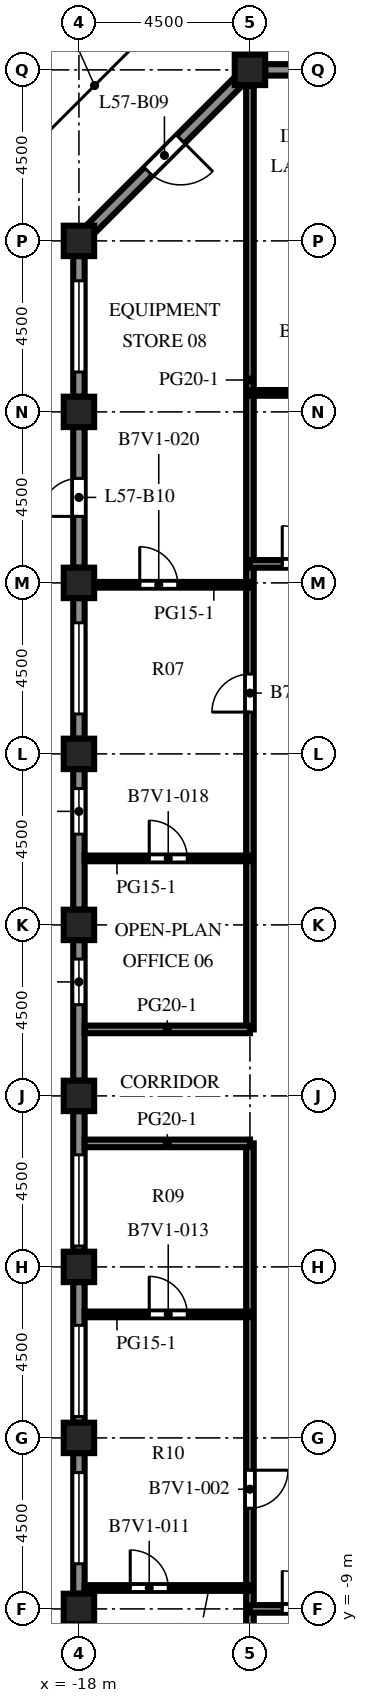
"""IFC4 building model, lengths in metres.
Left out: names, types, materials, properties, quantities, classifications, styles, units other than length and angle.
Written with IfcOpenShell. Run it as: python <this file> out.ifc"""

import sys

from ifc_helpers import new_model, si_unit, direction, frame, frame_2d, origin, origin_2d, place, context, subcontext, project, spatial, rectangle, extrude, element, fill, save


model = new_model("IFC4")
c1 = context("Model", 3, precision=1e-05, world=origin(), true_north=direction((0.0, 1.0)))
c2 = subcontext(c1, "Body", "Model", "MODEL_VIEW")
j1 = project(units=[si_unit("LENGTHUNIT", "METRE"), si_unit("PLANEANGLEUNIT", "RADIAN")], contexts=[c1])
p1 = place(None, origin())
s1 = spatial("IfcSite", under=j1, at=p1, CompositionType="ELEMENT")
p2 = place(p1, origin())
s2 = spatial("IfcBuilding", under=s1, at=p2, CompositionType="ELEMENT")
p3 = place(p2, frame((0.0, 0.0, 252.1)))
s3 = spatial("IfcBuildingStorey", under=s2, at=p3, CompositionType="ELEMENT", Elevation=252.1)
for number, where, z_axis, x_axis in (
    (1, (-18.0, -9.0, 0.0), (0.0, 0.0, 1.0), (1.0, 0.0, 0.0)),
    (2, (-18.0, -4.5, 0.0), (0.0, 0.0, 1.0), (1.0, 0.0, 0.0)),
    (3, (-18.0, 0.0, 0.0), (0.0, 0.0, 1.0), (1.0, 0.0, 0.0)),
    (4, (-18.0, 4.5, 0.0), (0.0, 0.0, 1.0), (1.0, 0.0, 0.0)),
    (5, (-18.0, 9.0, 0.0), (0.0, 0.0, 1.0), (1.0, 0.0, 0.0)),
    (6, (-18.0, 13.5, 0.0), (0.0, 0.0, 1.0), (1.0, 0.0, 0.0)),
    (7, (-18.0, 18.0, 0.0), (0.0, 0.0, 1.0), (1.0, 0.0, 0.0)),
    (8, (-18.0, 22.5, 0.0), (0.0, 0.0, 1.0), (1.0, 0.0, 0.0)),
    (9, (-18.0, 27.0, 0.0), (0.0, 0.0, 1.0), (1.0, 0.0, 0.0)),
    (10, (-13.5, 31.5, 0.0), (0.0, 0.0, 1.0), (1.0, 0.0, 0.0)),
):
    element("IfcColumn", number, at=place(p3, frame(where, z_axis=z_axis, x_axis=x_axis)), inside=s3, PredefinedType="COLUMN", context=c2, shape_type="SweptSolid", body=[
        extrude(rectangle(XDim=0.8, YDim=0.8, at=origin_2d()), origin(), (0.0, 0.0, 1.0), 4.1),
    ])
p4 = place(p3, frame((-13.1, 31.5, 0.0), z_axis=(0.0, 0.0, 1.0), x_axis=(1.0, 0.0, 0.0)))
e11 = element("IfcWall", 11, at=p4, inside=s3, PredefinedType="SOLIDWALL", context=c2, shape_type="SweptSolid", body=[
    extrude(rectangle(XDim=3.7, YDim=0.3, at=frame_2d((1.85, 0.0))), origin(), (0.0, 0.0, 1.0), 2.85),
])
p5 = place(p4, frame((0.65, 0.0, 0.8)))
e12 = element("IfcOpeningElement", 12, at=p5, cuts=e11, PredefinedType="OPENING", context=c2, shape_type="SweptSolid", body=[
    extrude(rectangle(XDim=2.4, YDim=1.7, at=frame_2d((1.2, 0.85))), frame((0.0, 0.16, 0.0), z_axis=(0.0, -1.0, 0.0), x_axis=(1.0, 0.0, 0.0)), (0.0, 0.0, 1.0), 0.32),
])
p6 = place(p3, frame((-17.706, 27.294, 0.0), z_axis=(0.0, 0.0, 1.0), x_axis=(0.707106781187, 0.707106781187, 0.0)))
e13 = element("IfcWall", 13, at=p6, inside=s3, PredefinedType="SOLIDWALL", context=c2, shape_type="SweptSolid", body=[
    extrude(rectangle(XDim=5.532, YDim=0.3, at=frame_2d((2.766, 0.0))), origin(), (0.0, 0.0, 1.0), 2.85),
])
p7 = place(p6, frame((2.166, 0.0, 0.0)))
e14 = element("IfcOpeningElement", 14, at=p7, cuts=e13, PredefinedType="OPENING", context=c2, shape_type="SweptSolid", body=[
    extrude(rectangle(XDim=1.2, YDim=2.2, at=frame_2d((0.6, 1.1))), frame((0.0, 0.16, 0.0), z_axis=(0.0, -1.0, 0.0), x_axis=(1.0, 0.0, 0.0)), (0.0, 0.0, 1.0), 0.32),
])
p8 = place(p3, frame((-18.0, 22.9, 0.0), z_axis=(0.0, 0.0, 1.0), x_axis=(0.0, 1.0, 0.0)))
e15 = element("IfcWall", 15, at=p8, inside=s3, PredefinedType="SOLIDWALL", context=c2, shape_type="SweptSolid", body=[
    extrude(rectangle(XDim=3.7, YDim=0.3, at=frame_2d((1.85, 0.0))), origin(), (0.0, 0.0, 1.0), 2.85),
])
p9 = place(p8, frame((0.65, 0.0, 0.8)))
e16 = element("IfcOpeningElement", 16, at=p9, cuts=e15, PredefinedType="OPENING", context=c2, shape_type="SweptSolid", body=[
    extrude(rectangle(XDim=2.4, YDim=1.7, at=frame_2d((1.2, 0.85))), frame((0.0, 0.16, 0.0), z_axis=(0.0, -1.0, 0.0), x_axis=(1.0, 0.0, 0.0)), (0.0, 0.0, 1.0), 0.32),
])
p10 = place(p3, frame((-18.0, 18.4, 0.0), z_axis=(0.0, 0.0, 1.0), x_axis=(0.0, 1.0, 0.0)))
e17 = element("IfcWall", 17, at=p10, inside=s3, PredefinedType="SOLIDWALL", context=c2, shape_type="SweptSolid", body=[
    extrude(rectangle(XDim=3.7, YDim=0.3, at=frame_2d((1.85, 0.0))), origin(), (0.0, 0.0, 1.0), 2.85),
])
p11 = place(p10, frame((1.35, 0.0, 0.0)))
e18 = element("IfcOpeningElement", 18, at=p11, cuts=e17, PredefinedType="OPENING", context=c2, shape_type="SweptSolid", body=[
    extrude(rectangle(XDim=1.0, YDim=2.2, at=frame_2d((0.5, 1.1))), frame((0.0, 0.16, 0.0), z_axis=(0.0, -1.0, 0.0), x_axis=(1.0, 0.0, 0.0)), (0.0, 0.0, 1.0), 0.32),
])
p12 = place(p3, frame((-18.0, 13.9, 0.0), z_axis=(0.0, 0.0, 1.0), x_axis=(0.0, 1.0, 0.0)))
e19 = element("IfcWall", 19, at=p12, inside=s3, PredefinedType="SOLIDWALL", context=c2, shape_type="SweptSolid", body=[
    extrude(rectangle(XDim=3.7, YDim=0.3, at=frame_2d((1.85, 0.0))), origin(), (0.0, 0.0, 1.0), 2.85),
])
p13 = place(p12, frame((0.65, 0.0, 0.8)))
e20 = element("IfcOpeningElement", 20, at=p13, cuts=e19, PredefinedType="OPENING", context=c2, shape_type="SweptSolid", body=[
    extrude(rectangle(XDim=2.4, YDim=1.7, at=frame_2d((1.2, 0.85))), frame((0.0, 0.16, 0.0), z_axis=(0.0, -1.0, 0.0), x_axis=(1.0, 0.0, 0.0)), (0.0, 0.0, 1.0), 0.32),
])
p14 = place(p3, frame((-18.0, 9.4, 0.0), z_axis=(0.0, 0.0, 1.0), x_axis=(0.0, 1.0, 0.0)))
e21 = element("IfcWall", 21, at=p14, inside=s3, PredefinedType="SOLIDWALL", context=c2, shape_type="SweptSolid", body=[
    extrude(rectangle(XDim=3.7, YDim=0.3, at=frame_2d((1.85, 0.0))), origin(), (0.0, 0.0, 1.0), 2.85),
])
p15 = place(p14, frame((1.988, 0.0, 0.8)))
e22 = element("IfcOpeningElement", 22, at=p15, cuts=e21, PredefinedType="OPENING", context=c2, shape_type="SweptSolid", body=[
    extrude(rectangle(XDim=1.2, YDim=1.7, at=frame_2d((0.6, 0.85))), frame((0.0, 0.16, 0.0), z_axis=(0.0, -1.0, 0.0), x_axis=(1.0, 0.0, 0.0)), (0.0, 0.0, 1.0), 0.32),
])
p16 = place(p3, frame((-18.0, 4.9, 0.0), z_axis=(0.0, 0.0, 1.0), x_axis=(0.0, 1.0, 0.0)))
e23 = element("IfcWall", 23, at=p16, inside=s3, PredefinedType="SOLIDWALL", context=c2, shape_type="SweptSolid", body=[
    extrude(rectangle(XDim=3.7, YDim=0.3, at=frame_2d((1.85, 0.0))), origin(), (0.0, 0.0, 1.0), 2.85),
])
p17 = place(p16, frame((2.0, 0.0, 0.8)))
e24 = element("IfcOpeningElement", 24, at=p17, cuts=e23, PredefinedType="OPENING", context=c2, shape_type="SweptSolid", body=[
    extrude(rectangle(XDim=1.2, YDim=1.7, at=frame_2d((0.6, 0.85))), frame((0.0, 0.16, 0.0), z_axis=(0.0, -1.0, 0.0), x_axis=(1.0, 0.0, 0.0)), (0.0, 0.0, 1.0), 0.32),
])
p18 = place(p3, frame((-18.0, 0.4, 0.0), z_axis=(0.0, 0.0, 1.0), x_axis=(0.0, 1.0, 0.0)))
e25 = element("IfcWall", 25, at=p18, inside=s3, PredefinedType="SOLIDWALL", context=c2, shape_type="SweptSolid", body=[
    extrude(rectangle(XDim=3.7, YDim=0.3, at=frame_2d((1.85, 0.0))), origin(), (0.0, 0.0, 1.0), 2.85),
])
p19 = place(p18, frame((0.15, 0.0, 0.8)))
e26 = element("IfcOpeningElement", 26, at=p19, cuts=e25, PredefinedType="OPENING", context=c2, shape_type="SweptSolid", body=[
    extrude(rectangle(XDim=2.4, YDim=1.7, at=frame_2d((1.2, 0.85))), frame((0.0, 0.16, 0.0), z_axis=(0.0, -1.0, 0.0), x_axis=(1.0, 0.0, 0.0)), (0.0, 0.0, 1.0), 0.32),
])
p20 = place(p3, frame((-18.0, -4.1, 0.0), z_axis=(0.0, 0.0, 1.0), x_axis=(0.0, 1.0, 0.0)))
e27 = element("IfcWall", 27, at=p20, inside=s3, PredefinedType="SOLIDWALL", context=c2, shape_type="SweptSolid", body=[
    extrude(rectangle(XDim=3.7, YDim=0.3, at=frame_2d((1.85, 0.0))), origin(), (0.0, 0.0, 1.0), 2.85),
])
p21 = place(p20, frame((0.163, 0.0, 0.8)))
e28 = element("IfcOpeningElement", 28, at=p21, cuts=e27, PredefinedType="OPENING", context=c2, shape_type="SweptSolid", body=[
    extrude(rectangle(XDim=2.4, YDim=1.7, at=frame_2d((1.2, 0.85))), frame((0.0, 0.16, 0.0), z_axis=(0.0, -1.0, 0.0), x_axis=(1.0, 0.0, 0.0)), (0.0, 0.0, 1.0), 0.32),
])
p22 = place(p3, frame((-18.0, -8.6, 0.0), z_axis=(0.0, 0.0, 1.0), x_axis=(0.0, 1.0, 0.0)))
e29 = element("IfcWall", 29, at=p22, inside=s3, PredefinedType="SOLIDWALL", context=c2, shape_type="SweptSolid", body=[
    extrude(rectangle(XDim=3.7, YDim=0.3, at=frame_2d((1.85, 0.0))), origin(), (0.0, 0.0, 1.0), 2.85),
])
p23 = place(p22, frame((0.788, 0.0, 0.8)))
e30 = element("IfcOpeningElement", 30, at=p23, cuts=e29, PredefinedType="OPENING", context=c2, shape_type="SweptSolid", body=[
    extrude(rectangle(XDim=2.4, YDim=1.7, at=frame_2d((1.2, 0.85))), frame((0.0, 0.16, 0.0), z_axis=(0.0, -1.0, 0.0), x_axis=(1.0, 0.0, 0.0)), (0.0, 0.0, 1.0), 0.32),
])
p24 = place(p3, frame((-13.5, -22.077, 0.0), z_axis=(0.0, 0.0, 1.0), x_axis=(0.0, 1.0, 0.0)))
e31 = element("IfcWall", 31, at=p24, inside=s3, PredefinedType="PARTITIONING", context=c2, shape_type="SweptSolid", body=[
    extrude(rectangle(XDim=25.327, YDim=0.2, at=frame_2d((12.664, 0.0))), origin(), (0.0, 0.0, 1.0), 3.65),
])
p25 = place(p24, frame((15.727, 0.0, 0.0)))
e32 = element("IfcOpeningElement", 32, at=p25, cuts=e31, PredefinedType="OPENING", context=c2, shape_type="SweptSolid", body=[
    extrude(rectangle(XDim=1.0, YDim=2.1, at=frame_2d((0.5, 1.05))), frame((0.0, 0.11, 0.0), z_axis=(0.0, -1.0, 0.0), x_axis=(1.0, 0.0, 0.0)), (0.0, 0.0, 1.0), 0.22),
])
p26 = place(p3, frame((-13.5, 6.25, 0.0), z_axis=(0.0, 0.0, 1.0), x_axis=(0.0, 1.0, 0.0)))
e33 = element("IfcWall", 33, at=p26, inside=s3, PredefinedType="PARTITIONING", context=c2, shape_type="SweptSolid", body=[
    extrude(rectangle(XDim=24.827, YDim=0.2, at=frame_2d((12.414, 0.0))), origin(), (0.0, 0.0, 1.0), 3.65),
])
p27 = place(p26, frame((8.35, 0.0, 0.0)))
e34 = element("IfcOpeningElement", 34, at=p27, cuts=e33, PredefinedType="OPENING", context=c2, shape_type="SweptSolid", body=[
    extrude(rectangle(XDim=1.0, YDim=2.1, at=frame_2d((0.5, 1.05))), frame((0.0, 0.11, 0.0), z_axis=(0.0, -1.0, 0.0), x_axis=(1.0, 0.0, 0.0)), (0.0, 0.0, 1.0), 0.22),
])
p28 = place(p3, frame((-10.5, -9.0, 0.0), z_axis=(0.0, 0.0, 1.0), x_axis=(-1.0, 0.0, 0.0)))
e35 = element("IfcWall", 35, at=p28, inside=s3, PredefinedType="PARTITIONING", context=c2, shape_type="SweptSolid", body=[
    extrude(rectangle(XDim=3.0, YDim=0.2, at=frame_2d((1.5, 0.0))), origin(), (0.0, 0.0, 1.0), 3.65),
])
p29 = place(p28, frame((1.15, 0.0, 0.0)))
e36 = element("IfcOpeningElement", 36, at=p29, cuts=e35, PredefinedType="OPENING", context=c2, shape_type="SweptSolid", body=[
    extrude(rectangle(XDim=1.0, YDim=2.1, at=frame_2d((0.5, 1.05))), frame((0.0, 0.11, 0.0), z_axis=(0.0, -1.0, 0.0), x_axis=(1.0, 0.0, 0.0)), (0.0, 0.0, 1.0), 0.22),
])
p30 = place(p3, frame((-13.5, -8.45, 0.0), z_axis=(0.0, 0.0, 1.0), x_axis=(-1.0, 0.0, 0.0)))
e37 = element("IfcWall", 37, at=p30, inside=s3, PredefinedType="PARTITIONING", context=c2, shape_type="SweptSolid", body=[
    extrude(rectangle(XDim=4.35, YDim=0.15, at=frame_2d((2.175, 0.0))), origin(), (0.0, 0.0, 1.0), 3.65),
])
p31 = place(p30, frame((2.15, 0.0, 0.0)))
e38 = element("IfcOpeningElement", 38, at=p31, cuts=e37, PredefinedType="OPENING", context=c2, shape_type="SweptSolid", body=[
    extrude(rectangle(XDim=1.0, YDim=2.1, at=frame_2d((0.5, 1.05))), frame((0.0, 0.085, 0.0), z_axis=(0.0, -1.0, 0.0), x_axis=(1.0, 0.0, 0.0)), (0.0, 0.0, 1.0), 0.17),
])
p32 = place(p3, frame((-17.85, -1.25, 0.0), z_axis=(0.0, 0.0, 1.0), x_axis=(1.0, 0.0, 0.0)))
e39 = element("IfcWall", 39, at=p32, inside=s3, PredefinedType="PARTITIONING", context=c2, shape_type="SweptSolid", body=[
    extrude(rectangle(XDim=4.35, YDim=0.15, at=frame_2d((2.175, 0.0))), origin(), (0.0, 0.0, 1.0), 3.65),
])
p33 = place(p32, frame((1.7, 0.0, 0.0)))
e40 = element("IfcOpeningElement", 40, at=p33, cuts=e39, PredefinedType="OPENING", context=c2, shape_type="SweptSolid", body=[
    extrude(rectangle(XDim=1.0, YDim=2.1, at=frame_2d((0.5, 1.05))), frame((0.0, 0.085, 0.0), z_axis=(0.0, -1.0, 0.0), x_axis=(1.0, 0.0, 0.0)), (0.0, 0.0, 1.0), 0.17),
])
for number, where, z_axis, x_axis in (
    (41, (-17.85, 3.25, 0.0), (0.0, 0.0, 1.0), (1.0, 0.0, 0.0)),
    (42, (-17.85, 6.25, 0.0), (0.0, 0.0, 1.0), (1.0, 0.0, 0.0)),
):
    element("IfcWall", number, at=place(p3, frame(where, z_axis=z_axis, x_axis=x_axis)), inside=s3, PredefinedType="PARTITIONING", context=c2, shape_type="SweptSolid", body=[
        extrude(rectangle(XDim=4.35, YDim=0.2, at=frame_2d((2.175, 0.0))), origin(), (0.0, 0.0, 1.0), 3.65),
    ])
p34 = place(p3, frame((-13.5, 10.75, 0.0), z_axis=(0.0, 0.0, 1.0), x_axis=(-1.0, 0.0, 0.0)))
e43 = element("IfcWall", 43, at=p34, inside=s3, PredefinedType="PARTITIONING", context=c2, shape_type="SweptSolid", body=[
    extrude(rectangle(XDim=4.35, YDim=0.15, at=frame_2d((2.175, 0.0))), origin(), (0.0, 0.0, 1.0), 3.65),
])
p35 = place(p34, frame((1.65, 0.0, 0.0)))
e44 = element("IfcOpeningElement", 44, at=p35, cuts=e43, PredefinedType="OPENING", context=c2, shape_type="SweptSolid", body=[
    extrude(rectangle(XDim=1.0, YDim=2.1, at=frame_2d((0.5, 1.05))), frame((0.0, 0.085, 0.0), z_axis=(0.0, -1.0, 0.0), x_axis=(1.0, 0.0, 0.0)), (0.0, 0.0, 1.0), 0.17),
])
p36 = place(p3, frame((-17.6, 17.95, 0.0), z_axis=(0.0, 0.0, 1.0), x_axis=(1.0, 0.0, 0.0)))
e45 = element("IfcWall", 45, at=p36, inside=s3, PredefinedType="PARTITIONING", context=c2, shape_type="SweptSolid", body=[
    extrude(rectangle(XDim=4.1, YDim=0.15, at=frame_2d((2.05, 0.0))), origin(), (0.0, 0.0, 1.0), 3.65),
])
p37 = place(p36, frame((1.2, 0.0, 0.0)))
e46 = element("IfcOpeningElement", 46, at=p37, cuts=e45, PredefinedType="OPENING", context=c2, shape_type="SweptSolid", body=[
    extrude(rectangle(XDim=1.0, YDim=2.1, at=frame_2d((0.5, 1.05))), frame((0.0, 0.085, 0.0), z_axis=(0.0, -1.0, 0.0), x_axis=(1.0, 0.0, 0.0)), (0.0, 0.0, 1.0), 0.17),
])
p38 = place(p3, frame((-13.5, 18.5, 0.0), z_axis=(0.0, 0.0, 1.0), x_axis=(1.0, 0.0, 0.0)))
e47 = element("IfcWall", 47, at=p38, inside=s3, PredefinedType="PARTITIONING", context=c2, shape_type="SweptSolid", body=[
    extrude(rectangle(XDim=3.0, YDim=0.2, at=frame_2d((1.5, 0.0))), origin(), (0.0, 0.0, 1.0), 3.65),
])
p39 = place(p38, frame((0.85, 0.0, 0.0)))
e48 = element("IfcOpeningElement", 48, at=p39, cuts=e47, PredefinedType="OPENING", context=c2, shape_type="SweptSolid", body=[
    extrude(rectangle(XDim=1.0, YDim=2.1, at=frame_2d((0.5, 1.05))), frame((0.0, 0.11, 0.0), z_axis=(0.0, -1.0, 0.0), x_axis=(1.0, 0.0, 0.0)), (0.0, 0.0, 1.0), 0.22),
])
p40 = place(p3, frame((-13.5, 23.0, 0.0), z_axis=(0.0, 0.0, 1.0), x_axis=(1.0, 0.0, 0.0)))
e49 = element("IfcWall", 49, at=p40, inside=s3, PredefinedType="PARTITIONING", context=c2, shape_type="SweptSolid", body=[
    extrude(rectangle(XDim=4.0, YDim=0.15, at=frame_2d((2.0, 0.0))), origin(), (0.0, 0.0, 1.0), 3.65),
])
p41 = place(p40, frame((1.35, 0.0, 0.0)))
e50 = element("IfcOpeningElement", 50, at=p41, cuts=e49, PredefinedType="OPENING", context=c2, shape_type="SweptSolid", body=[
    extrude(rectangle(XDim=1.0, YDim=2.1, at=frame_2d((0.5, 1.05))), frame((0.0, 0.085, 0.0), z_axis=(0.0, -1.0, 0.0), x_axis=(1.0, 0.0, 0.0)), (0.0, 0.0, 1.0), 0.17),
])
p42 = place(p7, origin())
e51 = element("IfcDoor", 51, at=p42, inside=s3, OperationType="SINGLE_SWING_RIGHT", PredefinedType="DOOR", context=c2, shape_type="SweptSolid", body=[
    extrude(rectangle(XDim=1.2, YDim=2.2, at=frame_2d((0.6, 1.1))), frame((0.0, 0.025, 0.0), z_axis=(0.0, -1.0, 0.0), x_axis=(1.0, 0.0, 0.0)), (0.0, 0.0, 1.0), 0.05),
])
fill(e14, e51)
p43 = place(p9, origin())
e52 = element("IfcWindow", 52, at=p43, inside=s3, PartitioningType="SINGLE_PANEL", PredefinedType="WINDOW", context=c2, shape_type="SweptSolid", body=[
    extrude(rectangle(XDim=2.4, YDim=1.7, at=frame_2d((1.2, 0.85))), frame((0.0, 0.03, 0.0), z_axis=(0.0, -1.0, 0.0), x_axis=(1.0, 0.0, 0.0)), (0.0, 0.0, 1.0), 0.06),
])
fill(e16, e52)
p44 = place(p11, origin())
e53 = element("IfcDoor", 53, at=p44, inside=s3, OperationType="SINGLE_SWING_LEFT", PredefinedType="DOOR", context=c2, shape_type="SweptSolid", body=[
    extrude(rectangle(XDim=1.0, YDim=2.2, at=frame_2d((0.5, 1.1))), frame((0.0, 0.025, 0.0), z_axis=(0.0, -1.0, 0.0), x_axis=(1.0, 0.0, 0.0)), (0.0, 0.0, 1.0), 0.05),
])
fill(e18, e53)
p45 = place(p13, origin())
e54 = element("IfcWindow", 54, at=p45, inside=s3, PartitioningType="SINGLE_PANEL", PredefinedType="WINDOW", context=c2, shape_type="SweptSolid", body=[
    extrude(rectangle(XDim=2.4, YDim=1.7, at=frame_2d((1.2, 0.85))), frame((0.0, 0.03, 0.0), z_axis=(0.0, -1.0, 0.0), x_axis=(1.0, 0.0, 0.0)), (0.0, 0.0, 1.0), 0.06),
])
fill(e20, e54)
p46 = place(p15, origin())
e55 = element("IfcWindow", 55, at=p46, inside=s3, PartitioningType="SINGLE_PANEL", PredefinedType="WINDOW", context=c2, shape_type="SweptSolid", body=[
    extrude(rectangle(XDim=1.2, YDim=1.7, at=frame_2d((0.6, 0.85))), frame((0.0, 0.03, 0.0), z_axis=(0.0, -1.0, 0.0), x_axis=(1.0, 0.0, 0.0)), (0.0, 0.0, 1.0), 0.06),
])
fill(e22, e55)
p47 = place(p17, origin())
e56 = element("IfcWindow", 56, at=p47, inside=s3, PartitioningType="SINGLE_PANEL", PredefinedType="WINDOW", context=c2, shape_type="SweptSolid", body=[
    extrude(rectangle(XDim=1.2, YDim=1.7, at=frame_2d((0.6, 0.85))), frame((0.0, 0.03, 0.0), z_axis=(0.0, -1.0, 0.0), x_axis=(1.0, 0.0, 0.0)), (0.0, 0.0, 1.0), 0.06),
])
fill(e24, e56)
p48 = place(p19, origin())
e57 = element("IfcWindow", 57, at=p48, inside=s3, PartitioningType="SINGLE_PANEL", PredefinedType="WINDOW", context=c2, shape_type="SweptSolid", body=[
    extrude(rectangle(XDim=2.4, YDim=1.7, at=frame_2d((1.2, 0.85))), frame((0.0, 0.03, 0.0), z_axis=(0.0, -1.0, 0.0), x_axis=(1.0, 0.0, 0.0)), (0.0, 0.0, 1.0), 0.06),
])
fill(e26, e57)
p49 = place(p21, origin())
e58 = element("IfcWindow", 58, at=p49, inside=s3, PartitioningType="SINGLE_PANEL", PredefinedType="WINDOW", context=c2, shape_type="SweptSolid", body=[
    extrude(rectangle(XDim=2.4, YDim=1.7, at=frame_2d((1.2, 0.85))), frame((0.0, 0.03, 0.0), z_axis=(0.0, -1.0, 0.0), x_axis=(1.0, 0.0, 0.0)), (0.0, 0.0, 1.0), 0.06),
])
fill(e28, e58)
p50 = place(p23, origin())
e59 = element("IfcWindow", 59, at=p50, inside=s3, PartitioningType="SINGLE_PANEL", PredefinedType="WINDOW", context=c2, shape_type="SweptSolid", body=[
    extrude(rectangle(XDim=2.4, YDim=1.7, at=frame_2d((1.2, 0.85))), frame((0.0, 0.03, 0.0), z_axis=(0.0, -1.0, 0.0), x_axis=(1.0, 0.0, 0.0)), (0.0, 0.0, 1.0), 0.06),
])
fill(e30, e59)
p51 = place(p25, origin())
e60 = element("IfcDoor", 60, at=p51, inside=s3, OperationType="SINGLE_SWING_RIGHT", PredefinedType="DOOR", context=c2, shape_type="SweptSolid", body=[
    extrude(rectangle(XDim=1.0, YDim=2.1, at=frame_2d((0.5, 1.05))), frame((0.0, 0.025, 0.0), z_axis=(0.0, -1.0, 0.0), x_axis=(1.0, 0.0, 0.0)), (0.0, 0.0, 1.0), 0.05),
])
fill(e32, e60)
p52 = place(p27, origin())
e61 = element("IfcDoor", 61, at=p52, inside=s3, OperationType="SINGLE_SWING_LEFT", PredefinedType="DOOR", context=c2, shape_type="SweptSolid", body=[
    extrude(rectangle(XDim=1.0, YDim=2.1, at=frame_2d((0.5, 1.05))), frame((0.0, 0.025, 0.0), z_axis=(0.0, -1.0, 0.0), x_axis=(1.0, 0.0, 0.0)), (0.0, 0.0, 1.0), 0.05),
])
fill(e34, e61)
p53 = place(p29, origin())
e62 = element("IfcDoor", 62, at=p53, inside=s3, OperationType="SINGLE_SWING_RIGHT", PredefinedType="DOOR", context=c2, shape_type="SweptSolid", body=[
    extrude(rectangle(XDim=1.0, YDim=2.1, at=frame_2d((0.5, 1.05))), frame((0.0, 0.025, 0.0), z_axis=(0.0, -1.0, 0.0), x_axis=(1.0, 0.0, 0.0)), (0.0, 0.0, 1.0), 0.05),
])
fill(e36, e62)
p54 = place(p31, origin())
e63 = element("IfcDoor", 63, at=p54, inside=s3, OperationType="SINGLE_SWING_RIGHT", PredefinedType="DOOR", context=c2, shape_type="SweptSolid", body=[
    extrude(rectangle(XDim=1.0, YDim=2.1, at=frame_2d((0.5, 1.05))), frame((0.0, 0.025, 0.0), z_axis=(0.0, -1.0, 0.0), x_axis=(1.0, 0.0, 0.0)), (0.0, 0.0, 1.0), 0.05),
])
fill(e38, e63)
p55 = place(p33, origin())
e64 = element("IfcDoor", 64, at=p55, inside=s3, OperationType="SINGLE_SWING_LEFT", PredefinedType="DOOR", context=c2, shape_type="SweptSolid", body=[
    extrude(rectangle(XDim=1.0, YDim=2.1, at=frame_2d((0.5, 1.05))), frame((0.0, 0.025, 0.0), z_axis=(0.0, -1.0, 0.0), x_axis=(1.0, 0.0, 0.0)), (0.0, 0.0, 1.0), 0.05),
])
fill(e40, e64)
p56 = place(p35, origin())
e65 = element("IfcDoor", 65, at=p56, inside=s3, OperationType="SINGLE_SWING_RIGHT", PredefinedType="DOOR", context=c2, shape_type="SweptSolid", body=[
    extrude(rectangle(XDim=1.0, YDim=2.1, at=frame_2d((0.5, 1.05))), frame((0.0, 0.025, 0.0), z_axis=(0.0, -1.0, 0.0), x_axis=(1.0, 0.0, 0.0)), (0.0, 0.0, 1.0), 0.05),
])
fill(e44, e65)
p57 = place(p37, origin())
e66 = element("IfcDoor", 66, at=p57, inside=s3, OperationType="SINGLE_SWING_LEFT", PredefinedType="DOOR", context=c2, shape_type="SweptSolid", body=[
    extrude(rectangle(XDim=1.0, YDim=2.1, at=frame_2d((0.5, 1.05))), frame((0.0, 0.025, 0.0), z_axis=(0.0, -1.0, 0.0), x_axis=(1.0, 0.0, 0.0)), (0.0, 0.0, 1.0), 0.05),
])
fill(e46, e66)
p58 = place(p39, origin())
e67 = element("IfcDoor", 67, at=p58, inside=s3, OperationType="SINGLE_SWING_LEFT", PredefinedType="DOOR", context=c2, shape_type="SweptSolid", body=[
    extrude(rectangle(XDim=1.0, YDim=2.1, at=frame_2d((0.5, 1.05))), frame((0.0, 0.025, 0.0), z_axis=(0.0, -1.0, 0.0), x_axis=(1.0, 0.0, 0.0)), (0.0, 0.0, 1.0), 0.05),
])
fill(e48, e67)
save(model, sys.argv[1])
